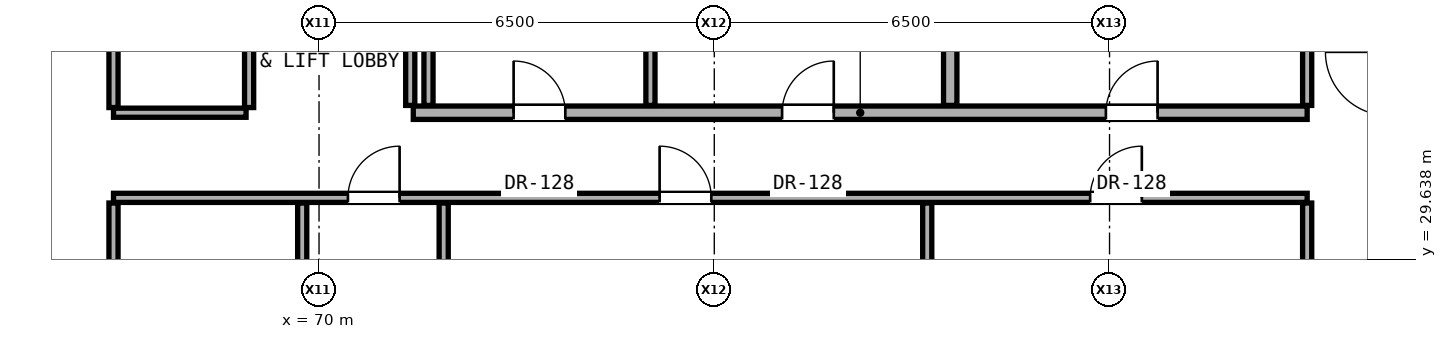
"""IFC4 building model, lengths in metres.
Left out: names, types, materials, properties, quantities, classifications, styles, units other than length and angle.
Written with IfcOpenShell. Run it as: python <this file> out.ifc"""

import sys

from ifc_helpers import new_model, si_unit, direction, frame, frame_2d, origin, place, context, subcontext, project, spatial, rectangle, extrude, element, fill, save


model = new_model("IFC4")
c1 = context("Model", 3, precision=1e-05, world=origin(), true_north=direction((0.0, 1.0)))
c2 = subcontext(c1, "Body", "Model", "MODEL_VIEW")
j1 = project(units=[si_unit("LENGTHUNIT", "METRE"), si_unit("PLANEANGLEUNIT", "RADIAN")], contexts=[c1])
p1 = place(None, origin())
s1 = spatial("IfcSite", under=j1, at=p1, CompositionType="ELEMENT")
p2 = place(p1, origin())
s2 = spatial("IfcBuilding", under=s1, at=p2, CompositionType="ELEMENT")
p3 = place(p2, frame((0.0, 0.0, 68.6)))
s3 = spatial("IfcBuildingStorey", under=s2, at=p3, CompositionType="ELEMENT", Elevation=68.6)
p4 = place(p3, frame((66.62, 30.65, 0.0), z_axis=(0.0, 0.0, 1.0), x_axis=(1.0, 0.0, 0.0)))
e1 = element("IfcWall", 1, at=p4, inside=s3, PredefinedType="PARTITIONING", context=c2, shape_type="SweptSolid", body=[
    extrude(rectangle(XDim=19.63, YDim=0.15, at=frame_2d((9.815, 0.0))), origin(), (0.0, 0.0, 1.0), 2.125),
])
p5 = place(p4, frame((3.855, 0.0, 0.0)))
e2 = element("IfcOpeningElement", 2, at=p5, cuts=e1, PredefinedType="OPENING", context=c2, shape_type="SweptSolid", body=[
    extrude(rectangle(XDim=0.85, YDim=2.01, at=frame_2d((0.425, 1.005))), frame((0.0, 0.085, 0.0), z_axis=(0.0, -1.0, 0.0), x_axis=(1.0, 0.0, 0.0)), (0.0, 0.0, 1.0), 0.17),
])
p6 = place(p4, frame((8.981, 0.0, 0.0)))
e3 = element("IfcOpeningElement", 3, at=p6, cuts=e1, PredefinedType="OPENING", context=c2, shape_type="SweptSolid", body=[
    extrude(rectangle(XDim=0.85, YDim=2.01, at=frame_2d((0.425, 1.005))), frame((0.0, 0.085, 0.0), z_axis=(0.0, -1.0, 0.0), x_axis=(1.0, 0.0, 0.0)), (0.0, 0.0, 1.0), 0.17),
])
p7 = place(p4, frame((16.061, 0.0, 0.0)))
e4 = element("IfcOpeningElement", 4, at=p7, cuts=e1, PredefinedType="OPENING", context=c2, shape_type="SweptSolid", body=[
    extrude(rectangle(XDim=0.85, YDim=2.01, at=frame_2d((0.425, 1.005))), frame((0.0, 0.085, 0.0), z_axis=(0.0, -1.0, 0.0), x_axis=(1.0, 0.0, 0.0)), (0.0, 0.0, 1.0), 0.17),
])
p8 = place(p3, frame((66.62, 32.05, 0.0), z_axis=(0.0, 0.0, 1.0), x_axis=(1.0, 0.0, 0.0)))
e5 = element("IfcWall", 5, at=p8, inside=s3, PredefinedType="PARTITIONING", context=c2, shape_type="SweptSolid", body=[
    extrude(rectangle(XDim=2.18, YDim=0.15, at=frame_2d((1.09, 0.0))), origin(), (0.0, 0.0, 1.0), 2.125),
])
p9 = place(p3, frame((71.55, 32.05, 0.0), z_axis=(0.0, 0.0, 1.0), x_axis=(1.0, 0.0, 0.0)))
e6 = element("IfcWall", 6, at=p9, inside=s3, PredefinedType="SOLIDWALL", context=c2, shape_type="SweptSolid", body=[
    extrude(rectangle(XDim=14.7, YDim=0.22, at=frame_2d((7.35, 0.0))), origin(), (0.0, 0.0, 1.0), 2.125),
])
p10 = place(p9, frame((11.39, 0.0, 0.0)))
e7 = element("IfcOpeningElement", 7, at=p10, cuts=e6, PredefinedType="OPENING", context=c2, shape_type="SweptSolid", body=[
    extrude(rectangle(XDim=0.85, YDim=2.01, at=frame_2d((0.425, 1.005))), frame((0.0, 0.12, 0.0), z_axis=(0.0, -1.0, 0.0), x_axis=(1.0, 0.0, 0.0)), (0.0, 0.0, 1.0), 0.24),
])
p11 = place(p9, frame((6.065, 0.0, 0.0)))
e8 = element("IfcOpeningElement", 8, at=p11, cuts=e6, PredefinedType="OPENING", context=c2, shape_type="SweptSolid", body=[
    extrude(rectangle(XDim=0.85, YDim=2.01, at=frame_2d((0.425, 1.005))), frame((0.0, 0.12, 0.0), z_axis=(0.0, -1.0, 0.0), x_axis=(1.0, 0.0, 0.0)), (0.0, 0.0, 1.0), 0.24),
])
p12 = place(p9, frame((1.65, 0.0, 0.0)))
e9 = element("IfcOpeningElement", 9, at=p12, cuts=e6, PredefinedType="OPENING", context=c2, shape_type="SweptSolid", body=[
    extrude(rectangle(XDim=0.85, YDim=2.01, at=frame_2d((0.425, 1.005))), frame((0.0, 0.12, 0.0), z_axis=(0.0, -1.0, 0.0), x_axis=(1.0, 0.0, 0.0)), (0.0, 0.0, 1.0), 0.24),
])
p13 = place(p3, frame((66.62, 24.935, 0.0), z_axis=(0.0, 0.0, 1.0), x_axis=(0.0, 1.0, 0.0)))
e10 = element("IfcWall", 10, at=p13, inside=s3, PredefinedType="PARTITIONING", context=c2, shape_type="SweptSolid", body=[
    extrude(rectangle(XDim=5.63, YDim=0.15, at=frame_2d((2.815, 0.0))), origin(), (0.0, 0.0, 1.0), 2.279),
])
p14 = place(p13, frame((2.34, 0.0, 0.0)))
e11 = element("IfcOpeningElement", 11, at=p14, cuts=e10, PredefinedType="OPENING", context=c2, shape_type="SweptSolid", body=[
    extrude(rectangle(XDim=0.95, YDim=2.15, at=frame_2d((0.475, 1.075))), frame((0.0, 0.085, 0.0), z_axis=(0.0, -1.0, 0.0), x_axis=(1.0, 0.0, 0.0)), (0.0, 0.0, 1.0), 0.17),
])
p15 = place(p3, frame((66.62, 32.135, 0.0), z_axis=(0.0, 0.0, 1.0), x_axis=(0.0, 1.0, 0.0)))
e12 = element("IfcWall", 12, at=p15, inside=s3, PredefinedType="PARTITIONING", context=c2, shape_type="SweptSolid", body=[
    extrude(rectangle(XDim=3.48, YDim=0.15, at=frame_2d((1.74, 0.0))), origin(), (0.0, 0.0, 1.0), 2.452),
])
p16 = place(p3, frame((68.85, 32.135, 0.0), z_axis=(0.0, 0.0, 1.0), x_axis=(0.0, 1.0, 0.0)))
e13 = element("IfcWall", 13, at=p16, inside=s3, PredefinedType="PARTITIONING", context=c2, shape_type="SweptSolid", body=[
    extrude(rectangle(XDim=2.745, YDim=0.15, at=frame_2d((1.373, 0.0))), origin(), (0.0, 0.0, 1.0), 3.06),
])
p17 = place(p3, frame((69.723, 24.935, 0.0), z_axis=(0.0, 0.0, 1.0), x_axis=(0.0, 1.0, 0.0)))
e14 = element("IfcWall", 14, at=p17, inside=s3, PredefinedType="PARTITIONING", context=c2, shape_type="SweptSolid", body=[
    extrude(rectangle(XDim=5.63, YDim=0.15, at=frame_2d((2.815, 0.0))), origin(), (0.0, 0.0, 1.0), 2.125),
])
for number, where, z_axis, x_axis in (
    (15, (71.5, 32.17, 0.0), (0.0, 0.0, 1.0), (0.0, 1.0, 0.0)),
    (16, (71.8, 32.17, 0.0), (0.0, 0.0, 1.0), (0.0, 1.0, 0.0)),
):
    element("IfcWall", number, at=place(p3, frame(where, z_axis=z_axis, x_axis=x_axis)), inside=s3, PredefinedType="PARTITIONING", context=c2, shape_type="SweptSolid", body=[
        extrude(rectangle(XDim=2.71, YDim=0.15, at=frame_2d((1.355, 0.0))), origin(), (0.0, 0.0, 1.0), 3.06),
    ])
p18 = place(p3, frame((72.05, 26.17, 0.0), z_axis=(0.0, 0.0, 1.0), x_axis=(0.0, 1.0, 0.0)))
e17 = element("IfcWall", 17, at=p18, inside=s3, PredefinedType="PARTITIONING", context=c2, shape_type="SweptSolid", body=[
    extrude(rectangle(XDim=4.395, YDim=0.15, at=frame_2d((2.198, 0.0))), origin(), (0.0, 0.0, 1.0), 2.125),
])
p19 = place(p3, frame((75.45, 32.17, 0.0), z_axis=(0.0, 0.0, 1.0), x_axis=(0.0, 1.0, 0.0)))
e18 = element("IfcWall", 18, at=p19, inside=s3, PredefinedType="PARTITIONING", context=c2, shape_type="SweptSolid", body=[
    extrude(rectangle(XDim=2.71, YDim=0.15, at=frame_2d((1.355, 0.0))), origin(), (0.0, 0.0, 1.0), 3.06),
])
p20 = place(p3, frame((80.002, 26.17, 0.0), z_axis=(0.0, 0.0, 1.0), x_axis=(0.0, 1.0, 0.0)))
e19 = element("IfcWall", 19, at=p20, inside=s3, PredefinedType="PARTITIONING", context=c2, shape_type="SweptSolid", body=[
    extrude(rectangle(XDim=4.395, YDim=0.15, at=frame_2d((2.198, 0.0))), origin(), (0.0, 0.0, 1.0), 2.125),
])
p21 = place(p3, frame((80.38, 32.17, 0.0), z_axis=(0.0, 0.0, 1.0), x_axis=(0.0, 1.0, 0.0)))
e20 = element("IfcWall", 20, at=p21, inside=s3, PredefinedType="SOLIDWALL", context=c2, shape_type="SweptSolid", body=[
    extrude(rectangle(XDim=2.71, YDim=0.22, at=frame_2d((1.355, 0.0))), origin(), (0.0, 0.0, 1.0), 3.06),
])
p22 = place(p3, frame((86.25, 26.17, 0.0), z_axis=(0.0, 0.0, 1.0), x_axis=(0.0, 1.0, 0.0)))
e21 = element("IfcWall", 21, at=p22, inside=s3, PredefinedType="PARTITIONING", context=c2, shape_type="SweptSolid", body=[
    extrude(rectangle(XDim=4.395, YDim=0.15, at=frame_2d((2.198, 0.0))), origin(), (0.0, 0.0, 1.0), 2.279),
])
p23 = place(p3, frame((86.25, 32.17, 0.0), z_axis=(0.0, 0.0, 1.0), x_axis=(0.0, 1.0, 0.0)))
e22 = element("IfcWall", 22, at=p23, inside=s3, PredefinedType="PARTITIONING", context=c2, shape_type="SweptSolid", body=[
    extrude(rectangle(XDim=2.795, YDim=0.15, at=frame_2d((1.397, 0.0))), origin(), (0.0, 0.0, 1.0), 2.452),
])
p24 = place(p10, origin())
e23 = element("IfcDoor", 23, at=p24, inside=s3, OperationType="SINGLE_SWING_RIGHT", PredefinedType="DOOR", context=c2, shape_type="SweptSolid", body=[
    extrude(rectangle(XDim=0.85, YDim=2.01, at=frame_2d((0.425, 1.005))), frame((0.0, 0.025, 0.0), z_axis=(0.0, -1.0, 0.0), x_axis=(1.0, 0.0, 0.0)), (0.0, 0.0, 1.0), 0.05),
])
fill(e7, e23)
p25 = place(p11, origin())
e24 = element("IfcDoor", 24, at=p25, inside=s3, OperationType="SINGLE_SWING_RIGHT", PredefinedType="DOOR", context=c2, shape_type="SweptSolid", body=[
    extrude(rectangle(XDim=0.85, YDim=2.01, at=frame_2d((0.425, 1.005))), frame((0.0, 0.025, 0.0), z_axis=(0.0, -1.0, 0.0), x_axis=(1.0, 0.0, 0.0)), (0.0, 0.0, 1.0), 0.05),
])
fill(e8, e24)
p26 = place(p12, origin())
e25 = element("IfcDoor", 25, at=p26, inside=s3, OperationType="SINGLE_SWING_LEFT", PredefinedType="DOOR", context=c2, shape_type="SweptSolid", body=[
    extrude(rectangle(XDim=0.85, YDim=2.01, at=frame_2d((0.425, 1.005))), frame((0.0, 0.025, 0.0), z_axis=(0.0, -1.0, 0.0), x_axis=(1.0, 0.0, 0.0)), (0.0, 0.0, 1.0), 0.05),
])
fill(e9, e25)
p27 = place(p5, origin())
e26 = element("IfcDoor", 26, at=p27, inside=s3, OperationType="SINGLE_SWING_RIGHT", PredefinedType="DOOR", context=c2, shape_type="SweptSolid", body=[
    extrude(rectangle(XDim=0.85, YDim=2.01, at=frame_2d((0.425, 1.005))), frame((0.0, 0.025, 0.0), z_axis=(0.0, -1.0, 0.0), x_axis=(1.0, 0.0, 0.0)), (0.0, 0.0, 1.0), 0.05),
])
fill(e2, e26)
p28 = place(p6, origin())
e27 = element("IfcDoor", 27, at=p28, inside=s3, OperationType="SINGLE_SWING_LEFT", PredefinedType="DOOR", context=c2, shape_type="SweptSolid", body=[
    extrude(rectangle(XDim=0.85, YDim=2.01, at=frame_2d((0.425, 1.005))), frame((0.0, 0.025, 0.0), z_axis=(0.0, -1.0, 0.0), x_axis=(1.0, 0.0, 0.0)), (0.0, 0.0, 1.0), 0.05),
])
fill(e3, e27)
p29 = place(p7, origin())
e28 = element("IfcDoor", 28, at=p29, inside=s3, OperationType="SINGLE_SWING_RIGHT", PredefinedType="DOOR", context=c2, shape_type="SweptSolid", body=[
    extrude(rectangle(XDim=0.85, YDim=2.01, at=frame_2d((0.425, 1.005))), frame((0.0, 0.025, 0.0), z_axis=(0.0, -1.0, 0.0), x_axis=(1.0, 0.0, 0.0)), (0.0, 0.0, 1.0), 0.05),
])
fill(e4, e28)
save(model, sys.argv[1])
